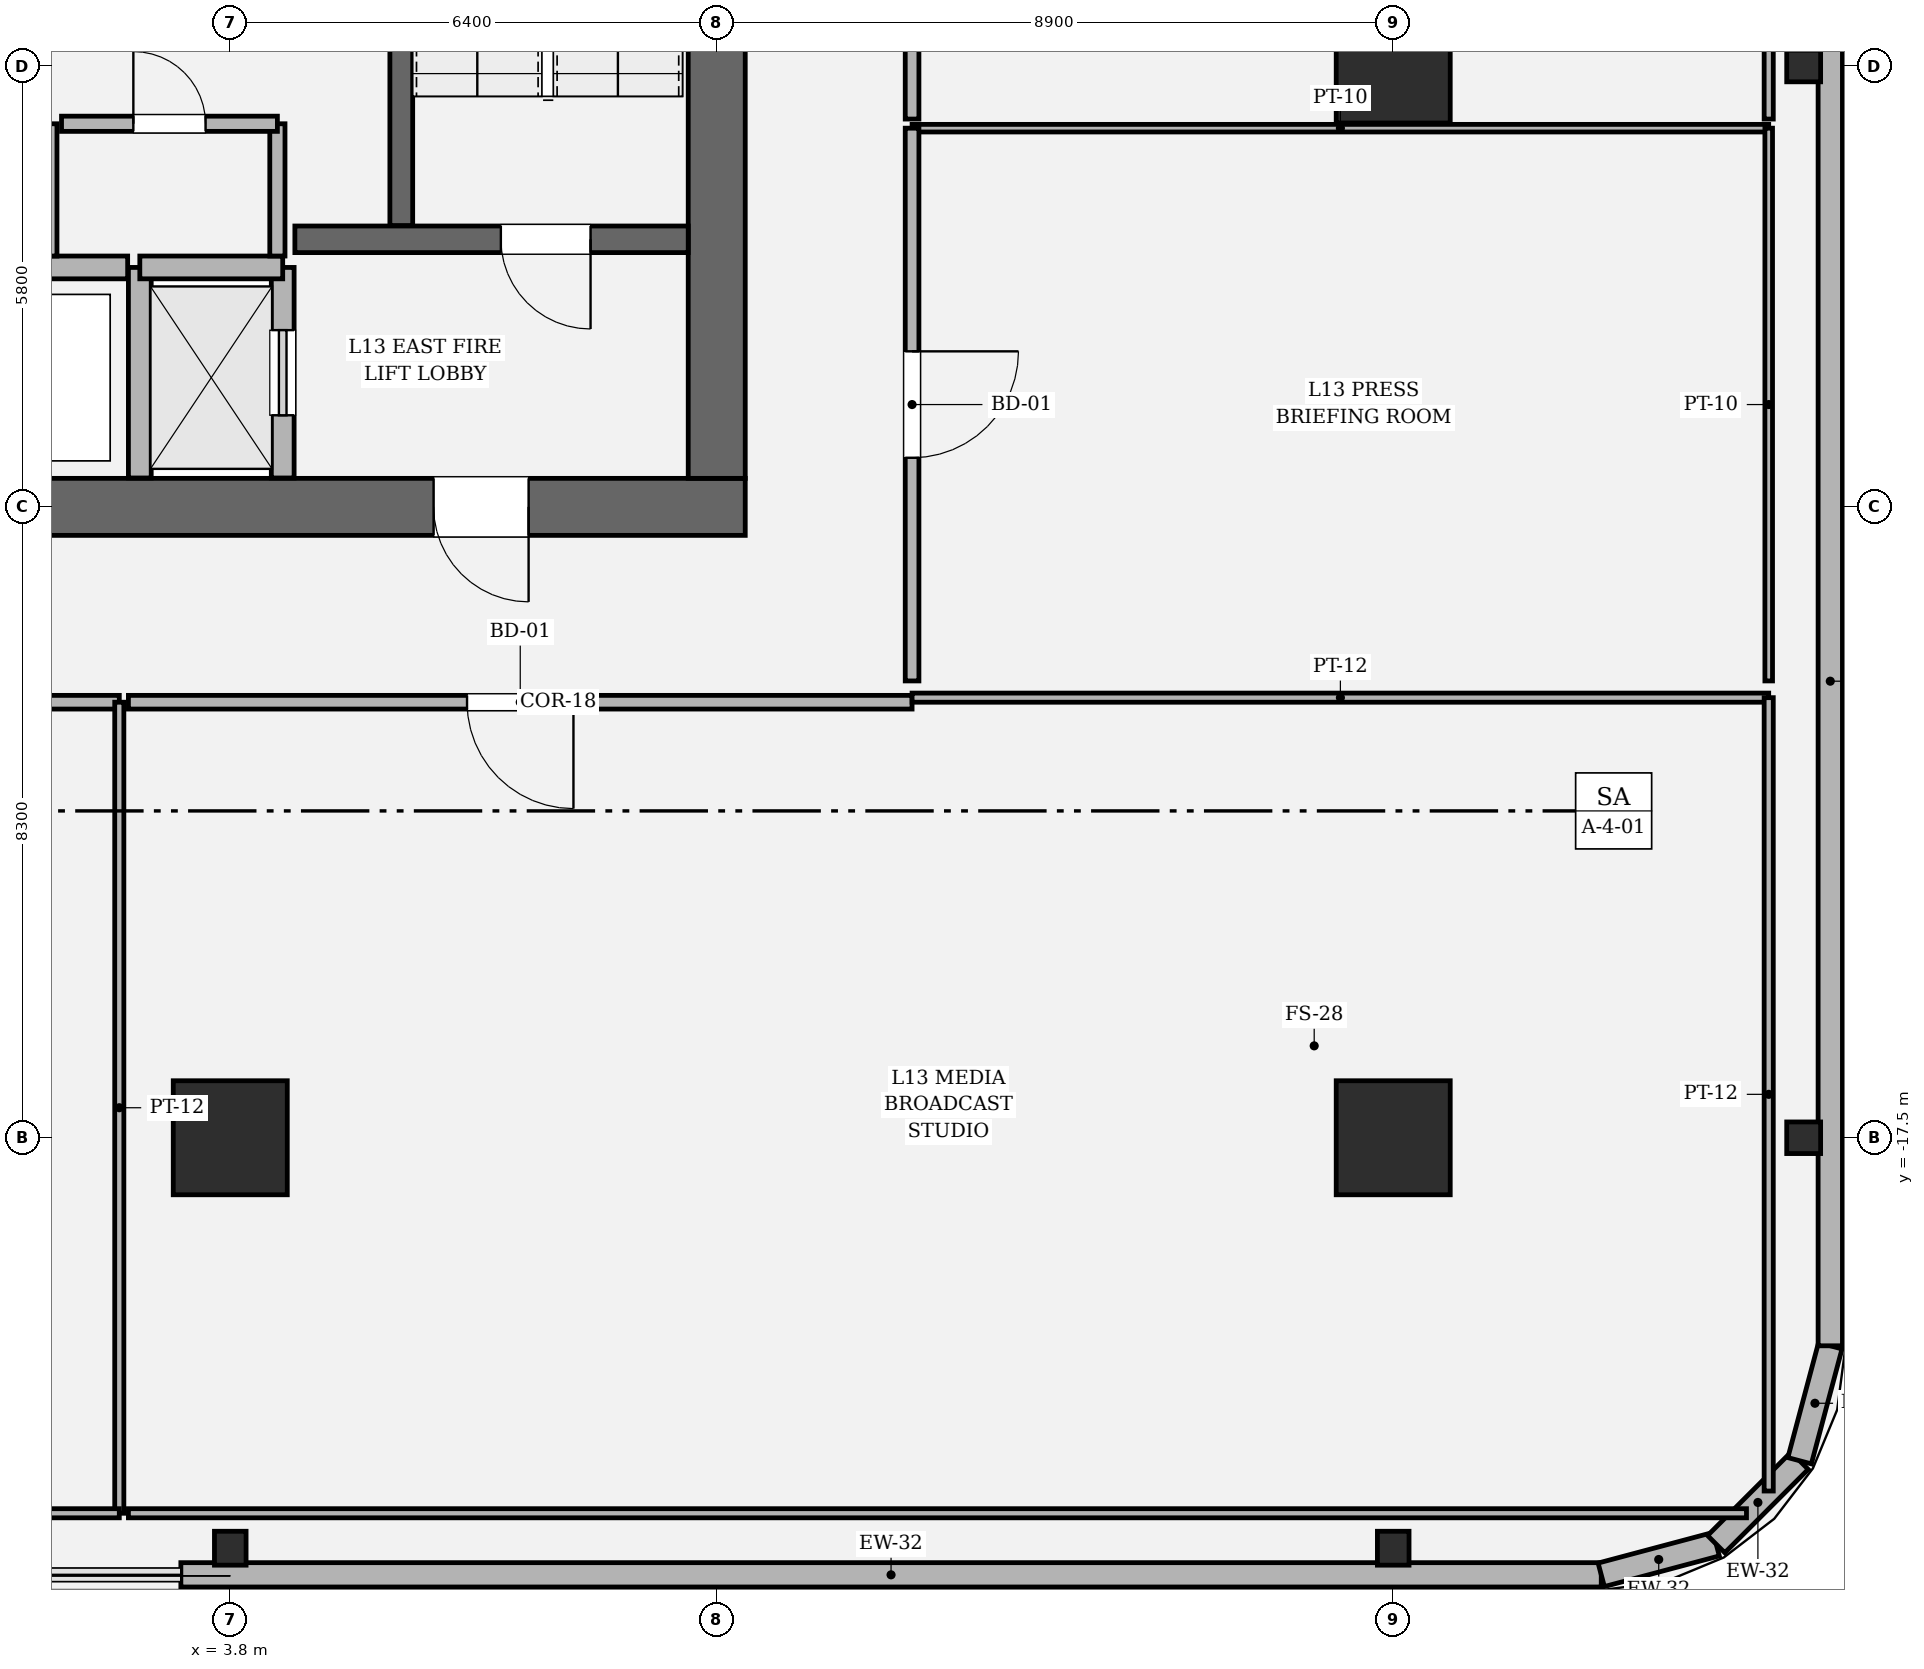
"""IFC4 building model, lengths in metres.
Left out: names, types, materials, properties, quantities, classifications, styles, units other than length and angle.
Written with IfcOpenShell. Run it as: python <this file> out.ifc"""

import sys

from ifc_helpers import new_model, si_unit, direction, frame, frame_2d, origin, origin_2d, place, context, subcontext, project, spatial, rectangle, hollow_rectangle, i_section, extrude, element, fill, save


model = new_model("IFC4")
c1 = context("Model", 3, precision=1e-05, world=origin(), true_north=direction((0.0, 1.0)))
c2 = subcontext(c1, "Body", "Model", "MODEL_VIEW")
j1 = project(units=[si_unit("LENGTHUNIT", "METRE"), si_unit("PLANEANGLEUNIT", "RADIAN")], contexts=[c1])
p1 = place(None, origin())
s1 = spatial("IfcSite", under=j1, at=p1, CompositionType="ELEMENT")
p2 = place(p1, origin())
s2 = spatial("IfcBuilding", under=s1, at=p2, CompositionType="ELEMENT")
p3 = place(p2, frame((0.0, 0.0, 60.6)))
s3 = spatial("IfcBuildingStorey", under=s2, at=p3, CompositionType="ELEMENT", Elevation=60.6)
p4 = place(p3, frame((10.575, -9.2, 0.0), z_axis=(0.0, 0.0, 1.0), x_axis=(-1.0, 0.0, 0.0)))
e1 = element("IfcWall", 1, at=p4, inside=s3, PredefinedType="SHEAR", context=c2, shape_type="SweptSolid", body=[
    extrude(rectangle(XDim=21.15, YDim=0.75, at=frame_2d((10.575, 0.0))), origin(), (0.0, 0.0, 1.0), 4.05),
])
p5 = place(p4, frame((2.85, 0.0, 0.0)))
e2 = element("IfcOpeningElement", 2, at=p5, cuts=e1, PredefinedType="OPENING", context=c2, shape_type="SweptSolid", body=[
    extrude(rectangle(XDim=1.25, YDim=2.25, at=frame_2d((0.625, 1.125))), frame((0.0, 0.385, 0.0), z_axis=(0.0, -1.0, 0.0), x_axis=(1.0, 0.0, 0.0)), (0.0, 0.0, 1.0), 0.77),
])
p6 = place(p4, frame((17.05, 0.0, 0.0)))
e3 = element("IfcOpeningElement", 3, at=p6, cuts=e1, PredefinedType="OPENING", context=c2, shape_type="SweptSolid", body=[
    extrude(rectangle(XDim=1.25, YDim=2.25, at=frame_2d((0.625, 1.125))), frame((0.0, 0.385, 0.0), z_axis=(0.0, -1.0, 0.0), x_axis=(1.0, 0.0, 0.0)), (0.0, 0.0, 1.0), 0.77),
])
p7 = place(p3, frame((10.2, 8.825, 0.0), z_axis=(0.0, 0.0, 1.0), x_axis=(0.0, -1.0, 0.0)))
e4 = element("IfcWall", 4, at=p7, inside=s3, PredefinedType="SHEAR", context=c2, shape_type="SweptSolid", body=[
    extrude(rectangle(XDim=17.65, YDim=0.75, at=frame_2d((8.825, 0.0))), origin(), (0.0, 0.0, 1.0), 4.05),
])
p8 = place(p7, frame((3.855, 0.0, 0.0)))
e5 = element("IfcOpeningElement", 5, at=p8, cuts=e4, PredefinedType="OPENING", context=c2, shape_type="SweptSolid", body=[
    extrude(rectangle(XDim=1.18, YDim=2.2, at=frame_2d((0.59, 1.1))), frame((0.0, 0.385, 0.0), z_axis=(0.0, -1.0, 0.0), x_axis=(1.0, 0.0, 0.0)), (0.0, 0.0, 1.0), 0.77),
])
p9 = place(p3, frame((6.05, 3.45, 0.0), z_axis=(0.0, 0.0, 1.0), x_axis=(0.0, -1.0, 0.0)))
e6 = element("IfcWall", 6, at=p9, inside=s3, PredefinedType="SOLIDWALL", context=c2, shape_type="SweptSolid", body=[
    extrude(rectangle(XDim=8.95, YDim=0.3, at=frame_2d((4.475, 0.0))), origin(), (0.0, 0.0, 1.0), 4.05),
])
p10 = place(p3, frame((4.65, -5.68, 0.0), z_axis=(0.0, 0.0, 1.0), x_axis=(1.0, 0.0, 0.0)))
e7 = element("IfcWall", 7, at=p10, inside=s3, PredefinedType="SOLIDWALL", context=c2, shape_type="SweptSolid", body=[
    extrude(rectangle(XDim=5.175, YDim=0.35, at=frame_2d((2.587, 0.0))), origin(), (0.0, 0.0, 1.0), 4.05),
])
p11 = place(p10, frame((2.71, 0.0, 0.0)))
e8 = element("IfcOpeningElement", 8, at=p11, cuts=e7, PredefinedType="OPENING", context=c2, shape_type="SweptSolid", body=[
    extrude(rectangle(XDim=1.18, YDim=2.2, at=frame_2d((0.59, 1.1))), frame((0.0, 0.185, 0.0), z_axis=(0.0, -1.0, 0.0), x_axis=(1.0, 0.0, 0.0)), (0.0, 0.0, 1.0), 0.37),
])
for number, where, z_axis, x_axis in (
    (9, (3.8, -17.5, 0.0), (0.0, 0.0, 1.0), (1.0, 0.0, 0.0)),
    (10, (19.1, -17.5, 0.0), (0.0, 0.0, 1.0), (1.0, 0.0, 0.0)),
    (11, (19.1, -3.4, 0.0), (0.0, 0.0, 1.0), (1.0, 0.0, 0.0)),
):
    element("IfcColumn", number, at=place(p3, frame(where, z_axis=z_axis, x_axis=x_axis)), inside=s3, PredefinedType="COLUMN", context=c2, shape_type="SweptSolid", body=[
        extrude(hollow_rectangle(XDim=1.5, YDim=1.5, WallThickness=0.045, at=origin_2d()), origin(), (0.0, 0.0, 1.0), 4.05),
    ])
for number, where, z_axis, x_axis in (
    (12, (3.8, -22.9, 0.0), (0.0, 0.0, 1.0), (1.0, 0.0, 0.0)),
    (13, (19.1, -22.9, 0.0), (0.0, 0.0, 1.0), (1.0, 0.0, 0.0)),
    (14, (24.5, -17.5, 0.0), (0.0, 0.0, 1.0), (0.0, 1.0, 0.0)),
    (15, (24.5, -3.4, 0.0), (0.0, 0.0, 1.0), (0.0, 1.0, 0.0)),
):
    element("IfcColumn", number, at=place(p3, frame(where, z_axis=z_axis, x_axis=x_axis)), inside=s3, PredefinedType="COLUMN", context=c2, shape_type="SweptSolid", body=[
        extrude(i_section(OverallWidth=0.416, OverallDepth=0.446, WebThickness=0.039, FlangeThickness=0.062, FilletRadius=0.018, at=origin_2d()), origin(), (0.0, 0.0, 1.0), 4.048),
    ])
p12 = place(p3, frame((3.15, -23.25, 0.0), z_axis=(0.0, 0.0, 1.0), x_axis=(1.0, 0.0, 0.0)))
e16 = element("IfcWall", 16, at=p12, inside=s3, PredefinedType="SOLIDWALL", context=c2, shape_type="SweptSolid", body=[
    extrude(rectangle(XDim=18.687, YDim=0.32, at=frame_2d((9.344, 0.0))), origin(), (0.0, 0.0, 1.0), 2.524),
])
p13 = place(p3, frame((21.837, -23.25, 0.0), z_axis=(0.0, 0.0, 1.0), x_axis=(0.966224582397, 0.257701486942, 0.0)))
e17 = element("IfcWall", 17, at=p13, inside=s3, PredefinedType="SOLIDWALL", context=c2, shape_type="SweptSolid", body=[
    extrude(rectangle(XDim=1.565, YDim=0.32, at=frame_2d((0.783, 0.0))), origin(), (0.0, 0.0, 1.0), 3.81),
])
p14 = place(p3, frame((23.349, -22.847, 0.0), z_axis=(0.0, 0.0, 1.0), x_axis=(0.707028130747, 0.707185422879, 0.0)))
e18 = element("IfcWall", 18, at=p14, inside=s3, PredefinedType="SOLIDWALL", context=c2, shape_type="SweptSolid", body=[
    extrude(rectangle(XDim=1.552, YDim=0.32, at=frame_2d((0.776, 0.0))), origin(), (0.0, 0.0, 1.0), 3.81),
])
p15 = place(p3, frame((24.447, -21.749, 0.0), z_axis=(0.0, 0.0, 1.0), x_axis=(0.257847112249, 0.966185730957, 0.0)))
e19 = element("IfcWall", 19, at=p15, inside=s3, PredefinedType="SOLIDWALL", context=c2, shape_type="SweptSolid", body=[
    extrude(rectangle(XDim=1.565, YDim=0.32, at=frame_2d((0.783, 0.0))), origin(), (0.0, 0.0, 1.0), 3.81),
])
p16 = place(p3, frame((24.85, -20.237, 0.0), z_axis=(0.0, 0.0, 1.0), x_axis=(0.0, 1.0, 0.0)))
e20 = element("IfcWall", 20, at=p16, inside=s3, PredefinedType="SOLIDWALL", context=c2, shape_type="SweptSolid", body=[
    extrude(rectangle(XDim=17.487, YDim=0.32, at=frame_2d((8.743, 0.0))), origin(), (0.0, 0.0, 1.0), 2.524),
])
p17 = place(p3, frame((4.49, -8.82, 0.0), z_axis=(0.0, 0.0, 1.0), x_axis=(0.0, 1.0, 0.0)))
e21 = element("IfcWall", 21, at=p17, inside=s3, PredefinedType="SOLIDWALL", context=c2, shape_type="SweptSolid", body=[
    extrude(rectangle(XDim=2.77, YDim=0.3, at=frame_2d((1.385, 0.0))), origin(), (0.0, 0.0, 1.0), 3.81),
])
p18 = place(p17, frame((0.825, 0.0, 0.0)))
e22 = element("IfcOpeningElement", 22, at=p18, cuts=e21, PredefinedType="OPENING", context=c2, shape_type="SweptSolid", body=[
    extrude(rectangle(XDim=1.12, YDim=2.25, at=frame_2d((0.56, 1.125))), frame((0.0, 0.16, 0.0), z_axis=(0.0, -1.0, 0.0), x_axis=(1.0, 0.0, 0.0)), (0.0, 0.0, 1.0), 0.32),
])
p19 = place(p3, frame((2.61, -8.82, 0.0), z_axis=(0.0, 0.0, 1.0), x_axis=(0.0, 1.0, 0.0)))
e23 = element("IfcWall", 23, at=p19, inside=s3, PredefinedType="SOLIDWALL", context=c2, shape_type="SweptSolid", body=[
    extrude(rectangle(XDim=2.77, YDim=0.3, at=frame_2d((1.385, 0.0))), origin(), (0.0, 0.0, 1.0), 3.81),
])
p20 = place(p3, frame((2.61, -6.05, 0.0), z_axis=(0.0, 0.0, 1.0), x_axis=(1.0, 0.0, 0.0)))
e24 = element("IfcWall", 24, at=p20, inside=s3, PredefinedType="SOLIDWALL", context=c2, shape_type="SweptSolid", body=[
    extrude(rectangle(XDim=1.88, YDim=0.3, at=frame_2d((0.94, 0.0))), origin(), (0.0, 0.0, 1.0), 3.81),
])
p21 = place(p3, frame((-2.45, -6.05, 0.0), z_axis=(0.0, 0.0, 1.0), x_axis=(1.0, 0.0, 0.0)))
e25 = element("IfcWall", 25, at=p21, inside=s3, PredefinedType="SOLIDWALL", context=c2, shape_type="SweptSolid", body=[
    extrude(rectangle(XDim=4.9, YDim=0.3, at=frame_2d((2.45, 0.0))), origin(), (0.0, 0.0, 1.0), 3.81),
])
for number, where, z_axis, x_axis in (
    (26, (1.42, -5.9, 0.0), (0.0, 0.0, 1.0), (0.0, 1.0, 0.0)),
    (27, (4.42, -5.9, 0.0), (0.0, 0.0, 1.0), (0.0, 1.0, 0.0)),
):
    element("IfcWall", number, at=place(p3, frame(where, z_axis=z_axis, x_axis=x_axis)), inside=s3, PredefinedType="SOLIDWALL", context=c2, shape_type="SweptSolid", body=[
        extrude(rectangle(XDim=1.74, YDim=0.2, at=frame_2d((0.87, 0.0))), origin(), (0.0, 0.0, 1.0), 3.81),
    ])
p22 = place(p3, frame((4.42, -4.16, 0.0), z_axis=(0.0, 0.0, 1.0), x_axis=(-1.0, 0.0, 0.0)))
e28 = element("IfcWall", 28, at=p22, inside=s3, PredefinedType="SOLIDWALL", context=c2, shape_type="SweptSolid", body=[
    extrude(rectangle(XDim=2.84, YDim=0.2, at=frame_2d((1.42, 0.0))), origin(), (0.0, 0.0, 1.0), 3.81),
])
p23 = place(p22, frame((0.945, 0.0, 0.0)))
e29 = element("IfcOpeningElement", 29, at=p23, cuts=e28, PredefinedType="OPENING", context=c2, shape_type="SweptSolid", body=[
    extrude(rectangle(XDim=0.95, YDim=2.15, at=frame_2d((0.475, 1.075))), frame((0.0, 0.11, 0.0), z_axis=(0.0, -1.0, 0.0), x_axis=(1.0, 0.0, 0.0)), (0.0, 0.0, 1.0), 0.22),
])
p24 = place(p3, frame((-12.77, -11.77, 0.0), z_axis=(0.0, 0.0, 1.0), x_axis=(1.0, 0.0, 0.0)))
e30 = element("IfcWall", 30, at=p24, inside=s3, PredefinedType="PARTITIONING", context=c2, shape_type="SweptSolid", body=[
    extrude(rectangle(XDim=15.11, YDim=0.18, at=frame_2d((7.555, 0.0))), origin(), (0.0, 0.0, 1.0), 3.104),
])
p25 = place(p24, frame((7.03, 0.0, 0.0)))
e31 = element("IfcOpeningElement", 31, at=p25, cuts=e30, PredefinedType="OPENING", context=c2, shape_type="SweptSolid", body=[
    extrude(rectangle(XDim=1.05, YDim=2.2, at=frame_2d((0.525, 1.1))), frame((0.0, 0.1, 0.0), z_axis=(0.0, -1.0, 0.0), x_axis=(1.0, 0.0, 0.0)), (0.0, 0.0, 1.0), 0.2),
])
p26 = place(p3, frame((2.34, -11.77, 0.0), z_axis=(0.0, 0.0, 1.0), x_axis=(0.0, -1.0, 0.0)))
e32 = element("IfcWall", 32, at=p26, inside=s3, PredefinedType="PARTITIONING", context=c2, shape_type="SweptSolid", body=[
    extrude(rectangle(XDim=10.67, YDim=0.12, at=frame_2d((5.335, 0.0))), origin(), (0.0, 0.0, 1.0), 3.104),
])
p27 = place(p3, frame((2.34, -22.44, 0.0), z_axis=(0.0, 0.0, 1.0), x_axis=(-1.0, 0.0, 0.0)))
e33 = element("IfcWall", 33, at=p27, inside=s3, PredefinedType="PARTITIONING", context=c2, shape_type="SweptSolid", body=[
    extrude(rectangle(XDim=20.48, YDim=0.12, at=frame_2d((10.24, 0.0))), origin(), (0.0, 0.0, 1.0), 2.484),
])
p28 = place(p3, frame((2.46, -11.77, 0.0), z_axis=(0.0, 0.0, 1.0), x_axis=(1.0, 0.0, 0.0)))
e34 = element("IfcWall", 34, at=p28, inside=s3, PredefinedType="PARTITIONING", context=c2, shape_type="SweptSolid", body=[
    extrude(rectangle(XDim=10.31, YDim=0.18, at=frame_2d((5.155, 0.0))), origin(), (0.0, 0.0, 1.0), 3.104),
])
p29 = place(p28, frame((4.455, 0.0, 0.0)))
e35 = element("IfcOpeningElement", 35, at=p29, cuts=e34, PredefinedType="OPENING", context=c2, shape_type="SweptSolid", body=[
    extrude(rectangle(XDim=1.4, YDim=2.25, at=frame_2d((0.7, 1.125))), frame((0.0, 0.1, 0.0), z_axis=(0.0, -1.0, 0.0), x_axis=(1.0, 0.0, 0.0)), (0.0, 0.0, 1.0), 0.2),
])
p30 = place(p3, frame((12.77, -11.71, 0.0), z_axis=(0.0, 0.0, 1.0), x_axis=(1.0, 0.0, 0.0)))
e36 = element("IfcWall", 36, at=p30, inside=s3, PredefinedType="PARTITIONING", context=c2, shape_type="SweptSolid", body=[
    extrude(rectangle(XDim=11.27, YDim=0.12, at=frame_2d((5.635, 0.0))), origin(), (0.0, 0.0, 1.0), 3.104),
])
p31 = place(p3, frame((24.04, -11.71, 0.0), z_axis=(0.0, 0.0, 1.0), x_axis=(0.0, -1.0, 0.0)))
e37 = element("IfcWall", 37, at=p31, inside=s3, PredefinedType="PARTITIONING", context=c2, shape_type="SweptSolid", body=[
    extrude(rectangle(XDim=10.438, YDim=0.12, at=frame_2d((5.219, 0.0))), origin(), (0.0, 0.0, 1.0), 2.484),
])
p32 = place(p3, frame((23.748, -22.44, 0.0), z_axis=(0.0, 0.0, 1.0), x_axis=(-1.0, 0.0, 0.0)))
e38 = element("IfcWall", 38, at=p32, inside=s3, PredefinedType="PARTITIONING", context=c2, shape_type="SweptSolid", body=[
    extrude(rectangle(XDim=21.288, YDim=0.12, at=frame_2d((10.644, 0.0))), origin(), (0.0, 0.0, 1.0), 2.484),
])
p33 = place(p3, frame((12.77, -4.218, 0.0), z_axis=(0.0, 0.0, 1.0), x_axis=(1.0, 0.0, 0.0)))
e39 = element("IfcWall", 39, at=p33, inside=s3, PredefinedType="PARTITIONING", context=c2, shape_type="SweptSolid", body=[
    extrude(rectangle(XDim=11.27, YDim=0.1, at=frame_2d((5.635, 0.0))), origin(), (0.0, 0.0, 1.0), 3.104),
])
p34 = place(p3, frame((24.04, -4.218, 0.0), z_axis=(0.0, 0.0, 1.0), x_axis=(0.0, -1.0, 0.0)))
e40 = element("IfcWall", 40, at=p34, inside=s3, PredefinedType="PARTITIONING", context=c2, shape_type="SweptSolid", body=[
    extrude(rectangle(XDim=7.272, YDim=0.1, at=frame_2d((3.636, 0.0))), origin(), (0.0, 0.0, 1.0), 3.81),
])
p35 = place(p3, frame((12.77, -11.49, 0.0), z_axis=(0.0, 0.0, 1.0), x_axis=(0.0, 1.0, 0.0)))
e41 = element("IfcWall", 41, at=p35, inside=s3, PredefinedType="PARTITIONING", context=c2, shape_type="SweptSolid", body=[
    extrude(rectangle(XDim=7.272, YDim=0.18, at=frame_2d((3.636, 0.0))), origin(), (0.0, 0.0, 1.0), 3.104),
])
p36 = place(p35, frame((2.936, 0.0, 0.0)))
e42 = element("IfcOpeningElement", 42, at=p36, cuts=e41, PredefinedType="OPENING", context=c2, shape_type="SweptSolid", body=[
    extrude(rectangle(XDim=1.4, YDim=2.25, at=frame_2d((0.7, 1.125))), frame((0.0, 0.1, 0.0), z_axis=(0.0, -1.0, 0.0), x_axis=(1.0, 0.0, 0.0)), (0.0, 0.0, 1.0), 0.2),
])
p37 = place(p3, frame((24.04, 2.712, 0.0), z_axis=(0.0, 0.0, 1.0), x_axis=(0.0, -1.0, 0.0)))
e43 = element("IfcWall", 43, at=p37, inside=s3, PredefinedType="PARTITIONING", context=c2, shape_type="SweptSolid", body=[
    extrude(rectangle(XDim=6.81, YDim=0.12, at=frame_2d((3.405, 0.0))), origin(), (0.0, 0.0, 1.0), 2.484),
])
p38 = place(p3, frame((12.77, -4.098, 0.0), z_axis=(0.0, 0.0, 1.0), x_axis=(0.0, 1.0, 0.0)))
e44 = element("IfcWall", 44, at=p38, inside=s3, PredefinedType="PARTITIONING", context=c2, shape_type="SweptSolid", body=[
    extrude(rectangle(XDim=6.81, YDim=0.18, at=frame_2d((3.405, 0.0))), origin(), (0.0, 0.0, 1.0), 3.104),
])
p39 = place(p38, frame((2.88, 0.0, 0.0)))
e45 = element("IfcOpeningElement", 45, at=p39, cuts=e44, PredefinedType="OPENING", context=c2, shape_type="SweptSolid", body=[
    extrude(rectangle(XDim=1.05, YDim=2.2, at=frame_2d((0.525, 1.1))), frame((0.0, 0.1, 0.0), z_axis=(0.0, -1.0, 0.0), x_axis=(1.0, 0.0, 0.0)), (0.0, 0.0, 1.0), 0.2),
])
p40 = place(p11, origin())
e46 = element("IfcDoor", 46, at=p40, inside=s3, OperationType="SINGLE_SWING_RIGHT", PredefinedType="DOOR", context=c2, shape_type="SweptSolid", body=[
    extrude(rectangle(XDim=1.18, YDim=2.2, at=frame_2d((0.59, 1.1))), frame((0.0, 0.025, 0.0), z_axis=(0.0, -1.0, 0.0), x_axis=(1.0, 0.0, 0.0)), (0.0, 0.0, 1.0), 0.05),
])
fill(e8, e46)
p41 = place(p5, origin())
e47 = element("IfcDoor", 47, at=p41, inside=s3, OperationType="SINGLE_SWING_LEFT", PredefinedType="DOOR", context=c2, shape_type="SweptSolid", body=[
    extrude(rectangle(XDim=1.25, YDim=2.25, at=frame_2d((0.625, 1.125))), frame((0.0, 0.025, 0.0), z_axis=(0.0, -1.0, 0.0), x_axis=(1.0, 0.0, 0.0)), (0.0, 0.0, 1.0), 0.05),
])
fill(e2, e47)
p42 = place(p18, origin())
e48 = element("IfcDoor", 48, at=p42, inside=s3, OperationType="SLIDING_TO_RIGHT", PredefinedType="DOOR", context=c2, shape_type="SweptSolid", body=[
    extrude(rectangle(XDim=1.12, YDim=2.25, at=frame_2d((0.56, 1.125))), frame((0.0, 0.025, 0.0), z_axis=(0.0, -1.0, 0.0), x_axis=(1.0, 0.0, 0.0)), (0.0, 0.0, 1.0), 0.05),
])
fill(e22, e48)
p43 = place(p23, origin())
e49 = element("IfcDoor", 49, at=p43, inside=s3, OperationType="SINGLE_SWING_RIGHT", PredefinedType="DOOR", context=c2, shape_type="SweptSolid", body=[
    extrude(rectangle(XDim=0.95, YDim=2.15, at=frame_2d((0.475, 1.075))), frame((0.0, 0.025, 0.0), z_axis=(0.0, -1.0, 0.0), x_axis=(1.0, 0.0, 0.0)), (0.0, 0.0, 1.0), 0.05),
])
fill(e29, e49)
p44 = place(p29, origin())
e50 = element("IfcDoor", 50, at=p44, inside=s3, OperationType="SINGLE_SWING_RIGHT", PredefinedType="DOOR", context=c2, shape_type="SweptSolid", body=[
    extrude(rectangle(XDim=1.4, YDim=2.25, at=frame_2d((0.7, 1.125))), frame((0.0, 0.025, 0.0), z_axis=(0.0, -1.0, 0.0), x_axis=(1.0, 0.0, 0.0)), (0.0, 0.0, 1.0), 0.05),
])
fill(e35, e50)
p45 = place(p36, origin())
e51 = element("IfcDoor", 51, at=p45, inside=s3, OperationType="SINGLE_SWING_RIGHT", PredefinedType="DOOR", context=c2, shape_type="SweptSolid", body=[
    extrude(rectangle(XDim=1.4, YDim=2.25, at=frame_2d((0.7, 1.125))), frame((0.0, 0.025, 0.0), z_axis=(0.0, -1.0, 0.0), x_axis=(1.0, 0.0, 0.0)), (0.0, 0.0, 1.0), 0.05),
])
fill(e42, e51)
save(model, sys.argv[1])
